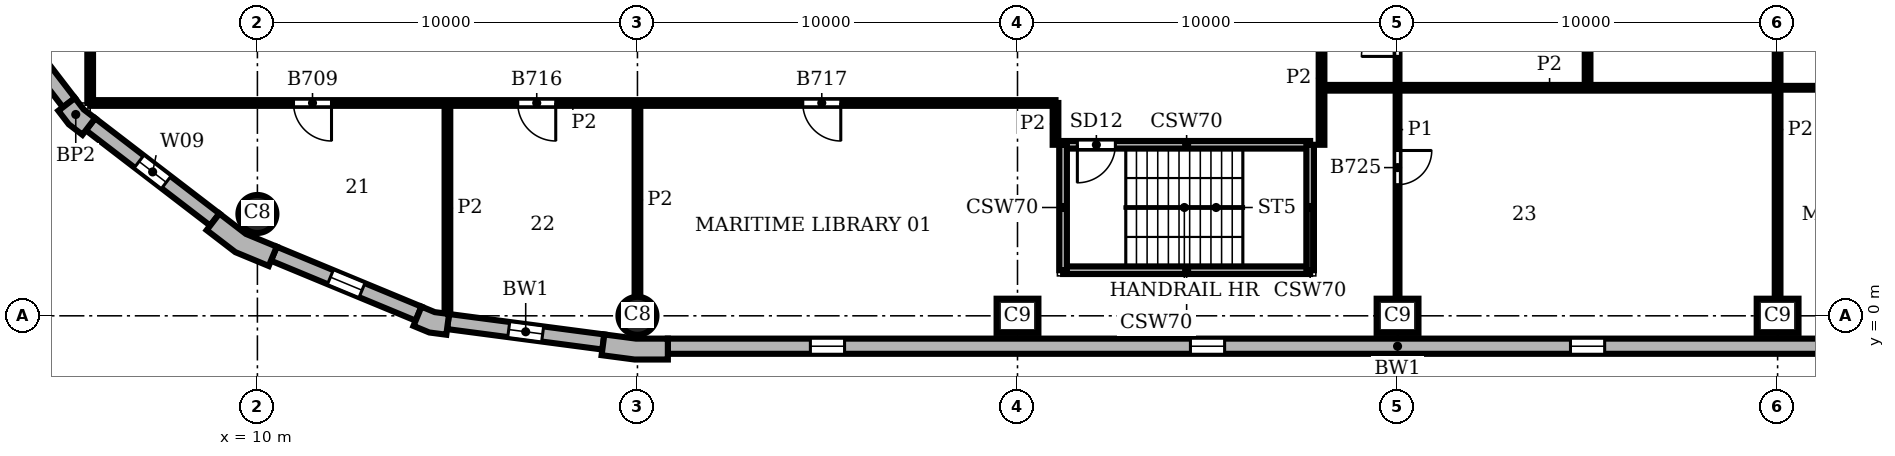
"""IFC4 building model, lengths in metres.
Left out: names, types, materials, properties, quantities, classifications, styles, units other than length and angle.
Written with IfcOpenShell. Run it as: python <this file> out.ifc"""

import sys

from ifc_helpers import new_model, si_unit, direction, frame, frame_2d, origin, origin_2d, place, context, subcontext, project, spatial, polyline, rectangle, circle, outline, extrude, element, fill, save


model = new_model("IFC4")
c1 = context("Model", 3, precision=1e-05, world=origin(), true_north=direction((0.0, 1.0)))
c2 = subcontext(c1, "Body", "Model", "MODEL_VIEW")
j1 = project(units=[si_unit("LENGTHUNIT", "METRE"), si_unit("PLANEANGLEUNIT", "RADIAN")], contexts=[c1])
p1 = place(None, origin())
s1 = spatial("IfcSite", under=j1, at=p1, CompositionType="ELEMENT")
p2 = place(p1, origin())
s2 = spatial("IfcBuilding", under=s1, at=p2, CompositionType="ELEMENT")
p3 = place(p2, frame((0.0, 0.0, 201.9)))
s3 = spatial("IfcBuildingStorey", under=s2, at=p3, CompositionType="ELEMENT", Elevation=201.9)
p4 = place(p3, frame((20.0, 0.0, 0.0), z_axis=(0.0, 0.0, 1.0), x_axis=(1.0, 0.0, 0.0)))
e1 = element("IfcColumn", 1, at=p4, inside=s3, PredefinedType="COLUMN", context=c2, shape_type="SweptSolid", body=[
    extrude(circle(Radius=0.5, at=origin_2d()), origin(), (0.0, 0.0, 1.0), 3.9),
])
for number, where, z_axis, x_axis in (
    (2, (30.0, 0.0, 0.0), (0.0, 0.0, 1.0), (1.0, 0.0, 0.0)),
    (3, (40.0, 0.0, 0.0), (0.0, 0.0, 1.0), (1.0, 0.0, 0.0)),
    (4, (50.0, 0.0, 0.0), (0.0, 0.0, 1.0), (1.0, 0.0, 0.0)),
):
    element("IfcColumn", number, at=place(p3, frame(where, z_axis=z_axis, x_axis=x_axis)), inside=s3, PredefinedType="COLUMN", context=c2, shape_type="SweptSolid", body=[
        extrude(rectangle(XDim=1.1, YDim=0.9, at=origin_2d()), origin(), (0.0, 0.0, 1.0), 3.9),
    ])
p5 = place(p3, frame((10.0, 2.679, 0.0), z_axis=(0.0, 0.0, 1.0), x_axis=(1.0, 0.0, 0.0)))
e5 = element("IfcColumn", 5, at=p5, inside=s3, PredefinedType="COLUMN", context=c2, shape_type="SweptSolid", body=[
    extrude(circle(Radius=0.5, at=origin_2d()), origin(), (0.0, 0.0, 1.0), 3.9),
])
p6 = place(p3, origin())
e6 = element("IfcWall", 6, at=p6, inside=s3, PredefinedType="SOLIDWALL", context=c2, shape_type="SweptSolid", body=[
    extrude(outline(polyline([(19.076, -0.887), (19.057, -1.036), (19.925, -1.15), (20.8, -1.15), (20.8, -1.0), (20.8, -0.6), (19.961, -0.6), (19.128, -0.49), (19.076, -0.887)])), origin(), (0.0, 0.0, 1.0), 3.9),
])
e7 = element("IfcWall", 7, at=p6, inside=s3, PredefinedType="SOLIDWALL", context=c2, shape_type="SweptSolid", body=[
    extrude(outline(polyline([(4.882, 5.487), (4.763, 5.396), (5.038, 5.038), (5.396, 4.763), (5.487, 4.882), (5.731, 5.199), (5.43, 5.43), (5.199, 5.731), (4.882, 5.487)])), origin(), (0.0, 0.0, 1.0), 3.9),
])
e8 = element("IfcWall", 8, at=p6, inside=s3, PredefinedType="SOLIDWALL", context=c2, shape_type="SweptSolid", body=[
    extrude(outline(polyline([(8.757, 2.373), (8.665, 2.254), (9.42, 1.675), (10.299, 1.311), (10.356, 1.449), (10.51, 1.819), (9.698, 2.155), (9.0, 2.69), (8.757, 2.373)])), origin(), (0.0, 0.0, 1.0), 3.9),
])
e9 = element("IfcWall", 9, at=p6, inside=s3, PredefinedType="SOLIDWALL", context=c2, shape_type="SweptSolid", body=[
    extrude(outline(polyline([(14.164, -0.128), (14.106, -0.266), (14.523, -0.439), (14.971, -0.498), (14.99, -0.349), (15.043, 0.047), (14.667, 0.097), (14.317, 0.242), (14.164, -0.128)])), origin(), (0.0, 0.0, 1.0), 3.9),
])
p7 = place(p3, frame((20.8, -0.8, 0.0), z_axis=(0.0, 0.0, 1.0), x_axis=(1.0, 0.0, 0.0)))
e10 = element("IfcWall", 10, at=p7, inside=s3, PredefinedType="SOLIDWALL", context=c2, shape_type="SweptSolid", body=[
    extrude(rectangle(XDim=38.4, YDim=0.4, at=frame_2d((19.2, 0.0))), origin(), (0.0, 0.0, 1.0), 3.9),
])
p8 = place(p7, frame((3.75, 0.0, 0.9)))
e11 = element("IfcOpeningElement", 11, at=p8, cuts=e10, PredefinedType="OPENING", context=c2, shape_type="SweptSolid", body=[
    extrude(rectangle(XDim=0.9, YDim=2.35, at=frame_2d((0.45, 1.175))), frame((0.0, 0.21, 0.0), z_axis=(0.0, -1.0, 0.0), x_axis=(1.0, 0.0, 0.0)), (0.0, 0.0, 1.0), 0.42),
])
p9 = place(p7, frame((13.75, 0.0, 0.9)))
e12 = element("IfcOpeningElement", 12, at=p9, cuts=e10, PredefinedType="OPENING", context=c2, shape_type="SweptSolid", body=[
    extrude(rectangle(XDim=0.9, YDim=2.35, at=frame_2d((0.45, 1.175))), frame((0.0, 0.21, 0.0), z_axis=(0.0, -1.0, 0.0), x_axis=(1.0, 0.0, 0.0)), (0.0, 0.0, 1.0), 0.42),
])
p10 = place(p7, frame((23.75, 0.0, 0.9)))
e13 = element("IfcOpeningElement", 13, at=p10, cuts=e10, PredefinedType="OPENING", context=c2, shape_type="SweptSolid", body=[
    extrude(rectangle(XDim=0.9, YDim=2.35, at=frame_2d((0.45, 1.175))), frame((0.0, 0.21, 0.0), z_axis=(0.0, -1.0, 0.0), x_axis=(1.0, 0.0, 0.0)), (0.0, 0.0, 1.0), 0.42),
])
p11 = place(p7, frame((33.75, 0.0, 0.9)))
e14 = element("IfcOpeningElement", 14, at=p11, cuts=e10, PredefinedType="OPENING", context=c2, shape_type="SweptSolid", body=[
    extrude(rectangle(XDim=0.9, YDim=2.35, at=frame_2d((0.45, 1.175))), frame((0.0, 0.21, 0.0), z_axis=(0.0, -1.0, 0.0), x_axis=(1.0, 0.0, 0.0)), (0.0, 0.0, 1.0), 0.42),
])
p12 = place(p3, frame((2.532, 8.878, 0.0), z_axis=(0.0, 0.0, 1.0), x_axis=(0.608759824817, -0.793354571229, 0.0)))
e15 = element("IfcWall", 15, at=p12, inside=s3, PredefinedType="SOLIDWALL", context=c2, shape_type="SweptSolid", body=[
    extrude(rectangle(XDim=4.121, YDim=0.4, at=frame_2d((2.061, 0.0))), origin(), (0.0, 0.0, 1.0), 3.9),
])
p13 = place(p12, frame((1.611, 0.0, 0.9)))
e16 = element("IfcOpeningElement", 16, at=p13, cuts=e15, PredefinedType="OPENING", context=c2, shape_type="SweptSolid", body=[
    extrude(rectangle(XDim=0.9, YDim=2.35, at=frame_2d((0.45, 1.175))), frame((0.0, 0.21, 0.0), z_axis=(0.0, -1.0, 0.0), x_axis=(1.0, 0.0, 0.0)), (0.0, 0.0, 1.0), 0.42),
])
p14 = place(p3, frame((5.609, 5.041, 0.0), z_axis=(0.0, 0.0, 1.0), x_axis=(0.793354571229, -0.608759824817, 0.0)))
e17 = element("IfcWall", 17, at=p14, inside=s3, PredefinedType="SOLIDWALL", context=c2, shape_type="SweptSolid", body=[
    extrude(rectangle(XDim=4.121, YDim=0.4, at=frame_2d((2.061, 0.0))), origin(), (0.0, 0.0, 1.0), 3.9),
])
p15 = place(p14, frame((1.611, 0.0, 0.9)))
e18 = element("IfcOpeningElement", 18, at=p15, cuts=e17, PredefinedType="OPENING", context=c2, shape_type="SweptSolid", body=[
    extrude(rectangle(XDim=0.9, YDim=2.35, at=frame_2d((0.45, 1.175))), frame((0.0, 0.21, 0.0), z_axis=(0.0, -1.0, 0.0), x_axis=(1.0, 0.0, 0.0)), (0.0, 0.0, 1.0), 0.42),
])
p16 = place(p3, frame((10.433, 1.634, 0.0), z_axis=(0.0, 0.0, 1.0), x_axis=(0.923863744394, -0.382721546029, 0.0)))
e19 = element("IfcWall", 19, at=p16, inside=s3, PredefinedType="SOLIDWALL", context=c2, shape_type="SweptSolid", body=[
    extrude(rectangle(XDim=4.121, YDim=0.4, at=frame_2d((2.061, 0.0))), origin(), (0.0, 0.0, 1.0), 3.9),
])
p17 = place(p16, frame((1.611, 0.0, 0.9)))
e20 = element("IfcOpeningElement", 20, at=p17, cuts=e19, PredefinedType="OPENING", context=c2, shape_type="SweptSolid", body=[
    extrude(rectangle(XDim=0.9, YDim=2.35, at=frame_2d((0.45, 1.175))), frame((0.0, 0.21, 0.0), z_axis=(0.0, -1.0, 0.0), x_axis=(1.0, 0.0, 0.0)), (0.0, 0.0, 1.0), 0.42),
])
p18 = place(p3, frame((15.017, -0.151, 0.0), z_axis=(0.0, 0.0, 1.0), x_axis=(0.991446429508, -0.130514280502, 0.0)))
e21 = element("IfcWall", 21, at=p18, inside=s3, PredefinedType="SOLIDWALL", context=c2, shape_type="SweptSolid", body=[
    extrude(rectangle(XDim=4.121, YDim=0.4, at=frame_2d((2.061, 0.0))), origin(), (0.0, 0.0, 1.0), 3.9),
])
p19 = place(p18, frame((1.611, 0.0, 0.9)))
e22 = element("IfcOpeningElement", 22, at=p19, cuts=e21, PredefinedType="OPENING", context=c2, shape_type="SweptSolid", body=[
    extrude(rectangle(XDim=0.9, YDim=2.35, at=frame_2d((0.45, 1.175))), frame((0.0, 0.21, 0.0), z_axis=(0.0, -1.0, 0.0), x_axis=(1.0, 0.0, 0.0)), (0.0, 0.0, 1.0), 0.42),
])
p20 = place(p3, frame((31.2, 1.2, 0.0), z_axis=(0.0, 0.0, 1.0), x_axis=(1.0, 0.0, 0.0)))
e23 = element("IfcWall", 23, at=p20, inside=s3, PredefinedType="SHEAR", context=c2, shape_type="SweptSolid", body=[
    extrude(rectangle(XDim=6.5, YDim=0.2, at=frame_2d((3.25, 0.0))), origin(), (0.0, 0.0, 1.0), 3.58),
])
p21 = place(p3, frame((31.2, 4.5, 0.0), z_axis=(0.0, 0.0, 1.0), x_axis=(1.0, 0.0, 0.0)))
e24 = element("IfcWall", 24, at=p21, inside=s3, PredefinedType="SHEAR", context=c2, shape_type="SweptSolid", body=[
    extrude(rectangle(XDim=6.5, YDim=0.2, at=frame_2d((3.25, 0.0))), origin(), (0.0, 0.0, 1.0), 3.58),
])
p22 = place(p21, frame((0.375, 0.0, 0.0)))
e25 = element("IfcOpeningElement", 25, at=p22, cuts=e24, PredefinedType="OPENING", context=c2, shape_type="SweptSolid", body=[
    extrude(rectangle(XDim=1.0, YDim=2.1, at=frame_2d((0.5, 1.05))), frame((0.0, 0.11, 0.0), z_axis=(0.0, -1.0, 0.0), x_axis=(1.0, 0.0, 0.0)), (0.0, 0.0, 1.0), 0.22),
])
for number, where, z_axis, x_axis in (
    (26, (31.2, 1.2, 0.0), (0.0, 0.0, 1.0), (0.0, 1.0, 0.0)),
    (27, (37.7, 1.2, 0.0), (0.0, 0.0, 1.0), (0.0, 1.0, 0.0)),
):
    element("IfcWall", number, at=place(p3, frame(where, z_axis=z_axis, x_axis=x_axis)), inside=s3, PredefinedType="SHEAR", context=c2, shape_type="SweptSolid", body=[
        extrude(rectangle(XDim=3.3, YDim=0.2, at=frame_2d((1.65, 0.0))), origin(), (0.0, 0.0, 1.0), 3.58),
    ])
p23 = place(p3, frame((40.0, 0.45, 0.0), z_axis=(0.0, 0.0, 1.0), x_axis=(0.0, 1.0, 0.0)))
e28 = element("IfcWall", 28, at=p23, inside=s3, PredefinedType="PARTITIONING", context=c2, shape_type="SweptSolid", body=[
    extrude(rectangle(XDim=8.9, YDim=0.1, at=frame_2d((4.45, 0.0))), origin(), (0.0, 0.0, 1.0), 3.58),
])
p24 = place(p23, frame((6.375, 0.0, 0.0)))
e29 = element("IfcOpeningElement", 29, at=p24, cuts=e28, PredefinedType="OPENING", context=c2, shape_type="SweptSolid", body=[
    extrude(rectangle(XDim=0.95, YDim=2.1, at=frame_2d((0.475, 1.05))), frame((0.0, 0.06, 0.0), z_axis=(0.0, -1.0, 0.0), x_axis=(1.0, 0.0, 0.0)), (0.0, 0.0, 1.0), 0.12),
])
p25 = place(p23, frame((3.0, 0.0, 0.0)))
e30 = element("IfcOpeningElement", 30, at=p25, cuts=e28, PredefinedType="OPENING", context=c2, shape_type="SweptSolid", body=[
    extrude(rectangle(XDim=0.9, YDim=2.1, at=frame_2d((0.45, 1.05))), frame((0.0, 0.06, 0.0), z_axis=(0.0, -1.0, 0.0), x_axis=(1.0, 0.0, 0.0)), (0.0, 0.0, 1.0), 0.12),
])
p26 = place(p3, frame((50.0, 6.0, 0.0), z_axis=(0.0, 0.0, 1.0), x_axis=(1.0, 0.0, 0.0)))
e31 = element("IfcWall", 31, at=p26, inside=s3, PredefinedType="PARTITIONING", context=c2, shape_type="SweptSolid", body=[
    extrude(rectangle(XDim=5.0, YDim=0.1, at=frame_2d((2.5, 0.0))), origin(), (0.0, 0.0, 1.0), 3.58),
])
p27 = place(p3, frame((5.6, 5.6, 0.0), z_axis=(0.0, 0.0, 1.0), x_axis=(0.0, 1.0, 0.0)))
e32 = element("IfcWall", 32, at=p27, inside=s3, PredefinedType="PARTITIONING", context=c2, shape_type="SweptSolid", body=[
    extrude(rectangle(XDim=22.4, YDim=0.15, at=frame_2d((11.2, 0.0))), origin(), (0.0, 0.0, 1.0), 3.58),
])
p28 = place(p27, frame((5.35, 0.0, 0.0)))
e33 = element("IfcOpeningElement", 33, at=p28, cuts=e32, PredefinedType="OPENING", context=c2, shape_type="SweptSolid", body=[
    extrude(rectangle(XDim=1.0, YDim=2.1, at=frame_2d((0.5, 1.05))), frame((0.0, 0.085, 0.0), z_axis=(0.0, -1.0, 0.0), x_axis=(1.0, 0.0, 0.0)), (0.0, 0.0, 1.0), 0.17),
])
p29 = place(p27, frame((11.5, 0.0, 0.0)))
e34 = element("IfcOpeningElement", 34, at=p29, cuts=e32, PredefinedType="OPENING", context=c2, shape_type="SweptSolid", body=[
    extrude(rectangle(XDim=1.0, YDim=2.1, at=frame_2d((0.5, 1.05))), frame((0.0, 0.085, 0.0), z_axis=(0.0, -1.0, 0.0), x_axis=(1.0, 0.0, 0.0)), (0.0, 0.0, 1.0), 0.17),
])
p30 = place(p27, frame((18.25, 0.0, 0.0)))
e35 = element("IfcOpeningElement", 35, at=p30, cuts=e32, PredefinedType="OPENING", context=c2, shape_type="SweptSolid", body=[
    extrude(rectangle(XDim=1.8, YDim=2.1, at=frame_2d((0.9, 1.05))), frame((0.0, 0.085, 0.0), z_axis=(0.0, -1.0, 0.0), x_axis=(1.0, 0.0, 0.0)), (0.0, 0.0, 1.0), 0.17),
])
p31 = place(p3, frame((15.0, 0.063, 0.0), z_axis=(0.0, 0.0, 1.0), x_axis=(0.0, 1.0, 0.0)))
e36 = element("IfcWall", 36, at=p31, inside=s3, PredefinedType="PARTITIONING", context=c2, shape_type="SweptSolid", body=[
    extrude(rectangle(XDim=5.537, YDim=0.15, at=frame_2d((2.769, 0.0))), origin(), (0.0, 0.0, 1.0), 3.58),
])
p32 = place(p3, frame((20.0, 0.5, 0.0), z_axis=(0.0, 0.0, 1.0), x_axis=(0.0, 1.0, 0.0)))
e37 = element("IfcWall", 37, at=p32, inside=s3, PredefinedType="PARTITIONING", context=c2, shape_type="SweptSolid", body=[
    extrude(rectangle(XDim=5.1, YDim=0.15, at=frame_2d((2.55, 0.0))), origin(), (0.0, 0.0, 1.0), 3.58),
])
p33 = place(p3, frame((31.0, 4.5, 0.0), z_axis=(0.0, 0.0, 1.0), x_axis=(0.0, 1.0, 0.0)))
e38 = element("IfcWall", 38, at=p33, inside=s3, PredefinedType="PARTITIONING", context=c2, shape_type="SweptSolid", body=[
    extrude(rectangle(XDim=1.1, YDim=0.15, at=frame_2d((0.55, 0.0))), origin(), (0.0, 0.0, 1.0), 3.58),
])
p34 = place(p3, frame((38.0, 4.5, 0.0), z_axis=(0.0, 0.0, 1.0), x_axis=(0.0, 1.0, 0.0)))
e39 = element("IfcWall", 39, at=p34, inside=s3, PredefinedType="PARTITIONING", context=c2, shape_type="SweptSolid", body=[
    extrude(rectangle(XDim=3.5, YDim=0.15, at=frame_2d((1.75, 0.0))), origin(), (0.0, 0.0, 1.0), 3.58),
])
p35 = place(p3, frame((45.0, 6.0, 0.0), z_axis=(0.0, 0.0, 1.0), x_axis=(0.0, 1.0, 0.0)))
e40 = element("IfcWall", 40, at=p35, inside=s3, PredefinedType="PARTITIONING", context=c2, shape_type="SweptSolid", body=[
    extrude(rectangle(XDim=7.5, YDim=0.15, at=frame_2d((3.75, 0.0))), origin(), (0.0, 0.0, 1.0), 3.58),
])
p36 = place(p3, frame((50.0, 0.45, 0.0), z_axis=(0.0, 0.0, 1.0), x_axis=(0.0, 1.0, 0.0)))
e41 = element("IfcWall", 41, at=p36, inside=s3, PredefinedType="PARTITIONING", context=c2, shape_type="SweptSolid", body=[
    extrude(rectangle(XDim=8.9, YDim=0.15, at=frame_2d((4.45, 0.0))), origin(), (0.0, 0.0, 1.0), 3.58),
])
p37 = place(p3, frame((5.6, 5.6, 0.0), z_axis=(0.0, 0.0, 1.0), x_axis=(1.0, 0.0, 0.0)))
e42 = element("IfcWall", 42, at=p37, inside=s3, PredefinedType="PARTITIONING", context=c2, shape_type="SweptSolid", body=[
    extrude(rectangle(XDim=25.4, YDim=0.15, at=frame_2d((12.7, 0.0))), origin(), (0.0, 0.0, 1.0), 3.58),
])
p38 = place(p37, frame((5.35, 0.0, 0.0)))
e43 = element("IfcOpeningElement", 43, at=p38, cuts=e42, PredefinedType="OPENING", context=c2, shape_type="SweptSolid", body=[
    extrude(rectangle(XDim=1.0, YDim=2.1, at=frame_2d((0.5, 1.05))), frame((0.0, 0.085, 0.0), z_axis=(0.0, -1.0, 0.0), x_axis=(1.0, 0.0, 0.0)), (0.0, 0.0, 1.0), 0.17),
])
p39 = place(p37, frame((11.25, 0.0, 0.0)))
e44 = element("IfcOpeningElement", 44, at=p39, cuts=e42, PredefinedType="OPENING", context=c2, shape_type="SweptSolid", body=[
    extrude(rectangle(XDim=1.0, YDim=2.1, at=frame_2d((0.5, 1.05))), frame((0.0, 0.085, 0.0), z_axis=(0.0, -1.0, 0.0), x_axis=(1.0, 0.0, 0.0)), (0.0, 0.0, 1.0), 0.17),
])
p40 = place(p37, frame((18.75, 0.0, 0.0)))
e45 = element("IfcOpeningElement", 45, at=p40, cuts=e42, PredefinedType="OPENING", context=c2, shape_type="SweptSolid", body=[
    extrude(rectangle(XDim=1.0, YDim=2.1, at=frame_2d((0.5, 1.05))), frame((0.0, 0.085, 0.0), z_axis=(0.0, -1.0, 0.0), x_axis=(1.0, 0.0, 0.0)), (0.0, 0.0, 1.0), 0.17),
])
p41 = place(p3, frame((38.0, 6.0, 0.0), z_axis=(0.0, 0.0, 1.0), x_axis=(1.0, 0.0, 0.0)))
e46 = element("IfcWall", 46, at=p41, inside=s3, PredefinedType="PARTITIONING", context=c2, shape_type="SweptSolid", body=[
    extrude(rectangle(XDim=12.0, YDim=0.15, at=frame_2d((6.0, 0.0))), origin(), (0.0, 0.0, 1.0), 3.58),
])
p42 = place(p8, origin())
e47 = element("IfcWindow", 47, at=p42, inside=s3, PartitioningType="SINGLE_PANEL", PredefinedType="WINDOW", context=c2, shape_type="SweptSolid", body=[
    extrude(rectangle(XDim=0.9, YDim=2.35, at=frame_2d((0.45, 1.175))), frame((0.0, 0.16, 0.0), z_axis=(0.0, -1.0, 0.0), x_axis=(1.0, 0.0, 0.0)), (0.0, 0.0, 1.0), 0.06),
])
fill(e11, e47)
p43 = place(p9, origin())
e48 = element("IfcWindow", 48, at=p43, inside=s3, PartitioningType="SINGLE_PANEL", PredefinedType="WINDOW", context=c2, shape_type="SweptSolid", body=[
    extrude(rectangle(XDim=0.9, YDim=2.35, at=frame_2d((0.45, 1.175))), frame((0.0, 0.16, 0.0), z_axis=(0.0, -1.0, 0.0), x_axis=(1.0, 0.0, 0.0)), (0.0, 0.0, 1.0), 0.06),
])
fill(e12, e48)
p44 = place(p10, origin())
e49 = element("IfcWindow", 49, at=p44, inside=s3, PartitioningType="SINGLE_PANEL", PredefinedType="WINDOW", context=c2, shape_type="SweptSolid", body=[
    extrude(rectangle(XDim=0.9, YDim=2.35, at=frame_2d((0.45, 1.175))), frame((0.0, 0.16, 0.0), z_axis=(0.0, -1.0, 0.0), x_axis=(1.0, 0.0, 0.0)), (0.0, 0.0, 1.0), 0.06),
])
fill(e13, e49)
p45 = place(p15, origin())
e50 = element("IfcWindow", 50, at=p45, inside=s3, PartitioningType="SINGLE_PANEL", PredefinedType="WINDOW", context=c2, shape_type="SweptSolid", body=[
    extrude(rectangle(XDim=0.9, YDim=2.35, at=frame_2d((0.45, 1.175))), frame((0.0, 0.16, 0.0), z_axis=(0.0, -1.0, 0.0), x_axis=(1.0, 0.0, 0.0)), (0.0, 0.0, 1.0), 0.06),
])
fill(e18, e50)
p46 = place(p17, origin())
e51 = element("IfcWindow", 51, at=p46, inside=s3, PartitioningType="SINGLE_PANEL", PredefinedType="WINDOW", context=c2, shape_type="SweptSolid", body=[
    extrude(rectangle(XDim=0.9, YDim=2.35, at=frame_2d((0.45, 1.175))), frame((0.0, 0.16, 0.0), z_axis=(0.0, -1.0, 0.0), x_axis=(1.0, 0.0, 0.0)), (0.0, 0.0, 1.0), 0.06),
])
fill(e20, e51)
p47 = place(p19, origin())
e52 = element("IfcWindow", 52, at=p47, inside=s3, PartitioningType="SINGLE_PANEL", PredefinedType="WINDOW", context=c2, shape_type="SweptSolid", body=[
    extrude(rectangle(XDim=0.9, YDim=2.35, at=frame_2d((0.45, 1.175))), frame((0.0, 0.16, 0.0), z_axis=(0.0, -1.0, 0.0), x_axis=(1.0, 0.0, 0.0)), (0.0, 0.0, 1.0), 0.06),
])
fill(e22, e52)
p48 = place(p22, frame((1.0, 0.0, 0.0), z_axis=(0.0, 0.0, 1.0), x_axis=(-1.0, 0.0, 0.0)))
e53 = element("IfcDoor", 53, at=p48, inside=s3, OperationType="SINGLE_SWING_RIGHT", PredefinedType="DOOR", context=c2, shape_type="SweptSolid", body=[
    extrude(rectangle(XDim=1.0, YDim=2.1, at=frame_2d((0.5, 1.05))), frame((0.0, 0.025, 0.0), z_axis=(0.0, -1.0, 0.0), x_axis=(1.0, 0.0, 0.0)), (0.0, 0.0, 1.0), 0.05),
])
fill(e25, e53)
p49 = place(p38, frame((1.0, 0.0, 0.0), z_axis=(0.0, 0.0, 1.0), x_axis=(-1.0, 0.0, 0.0)))
e54 = element("IfcDoor", 54, at=p49, inside=s3, OperationType="SINGLE_SWING_LEFT", PredefinedType="DOOR", context=c2, shape_type="SweptSolid", body=[
    extrude(rectangle(XDim=1.0, YDim=2.1, at=frame_2d((0.5, 1.05))), frame((0.0, 0.025, 0.0), z_axis=(0.0, -1.0, 0.0), x_axis=(1.0, 0.0, 0.0)), (0.0, 0.0, 1.0), 0.05),
])
fill(e43, e54)
p50 = place(p39, frame((1.0, 0.0, 0.0), z_axis=(0.0, 0.0, 1.0), x_axis=(-1.0, 0.0, 0.0)))
e55 = element("IfcDoor", 55, at=p50, inside=s3, OperationType="SINGLE_SWING_LEFT", PredefinedType="DOOR", context=c2, shape_type="SweptSolid", body=[
    extrude(rectangle(XDim=1.0, YDim=2.1, at=frame_2d((0.5, 1.05))), frame((0.0, 0.025, 0.0), z_axis=(0.0, -1.0, 0.0), x_axis=(1.0, 0.0, 0.0)), (0.0, 0.0, 1.0), 0.05),
])
fill(e44, e55)
p51 = place(p40, frame((1.0, 0.0, 0.0), z_axis=(0.0, 0.0, 1.0), x_axis=(-1.0, 0.0, 0.0)))
e56 = element("IfcDoor", 56, at=p51, inside=s3, OperationType="SINGLE_SWING_LEFT", PredefinedType="DOOR", context=c2, shape_type="SweptSolid", body=[
    extrude(rectangle(XDim=1.0, YDim=2.1, at=frame_2d((0.5, 1.05))), frame((0.0, 0.025, 0.0), z_axis=(0.0, -1.0, 0.0), x_axis=(1.0, 0.0, 0.0)), (0.0, 0.0, 1.0), 0.05),
])
fill(e45, e56)
p52 = place(p24, origin())
e57 = element("IfcDoor", 57, at=p52, inside=s3, OperationType="SINGLE_SWING_LEFT", PredefinedType="DOOR", context=c2, shape_type="SweptSolid", body=[
    extrude(rectangle(XDim=0.95, YDim=2.1, at=frame_2d((0.475, 1.05))), frame((0.0, 0.025, 0.0), z_axis=(0.0, -1.0, 0.0), x_axis=(1.0, 0.0, 0.0)), (0.0, 0.0, 1.0), 0.05),
])
fill(e29, e57)
p53 = place(p25, frame((0.9, 0.0, 0.0), z_axis=(0.0, 0.0, 1.0), x_axis=(-1.0, 0.0, 0.0)))
e58 = element("IfcDoor", 58, at=p53, inside=s3, OperationType="SINGLE_SWING_LEFT", PredefinedType="DOOR", context=c2, shape_type="SweptSolid", body=[
    extrude(rectangle(XDim=0.9, YDim=2.1, at=frame_2d((0.45, 1.05))), frame((0.0, 0.025, 0.0), z_axis=(0.0, -1.0, 0.0), x_axis=(1.0, 0.0, 0.0)), (0.0, 0.0, 1.0), 0.05),
])
fill(e30, e58)
save(model, sys.argv[1])
